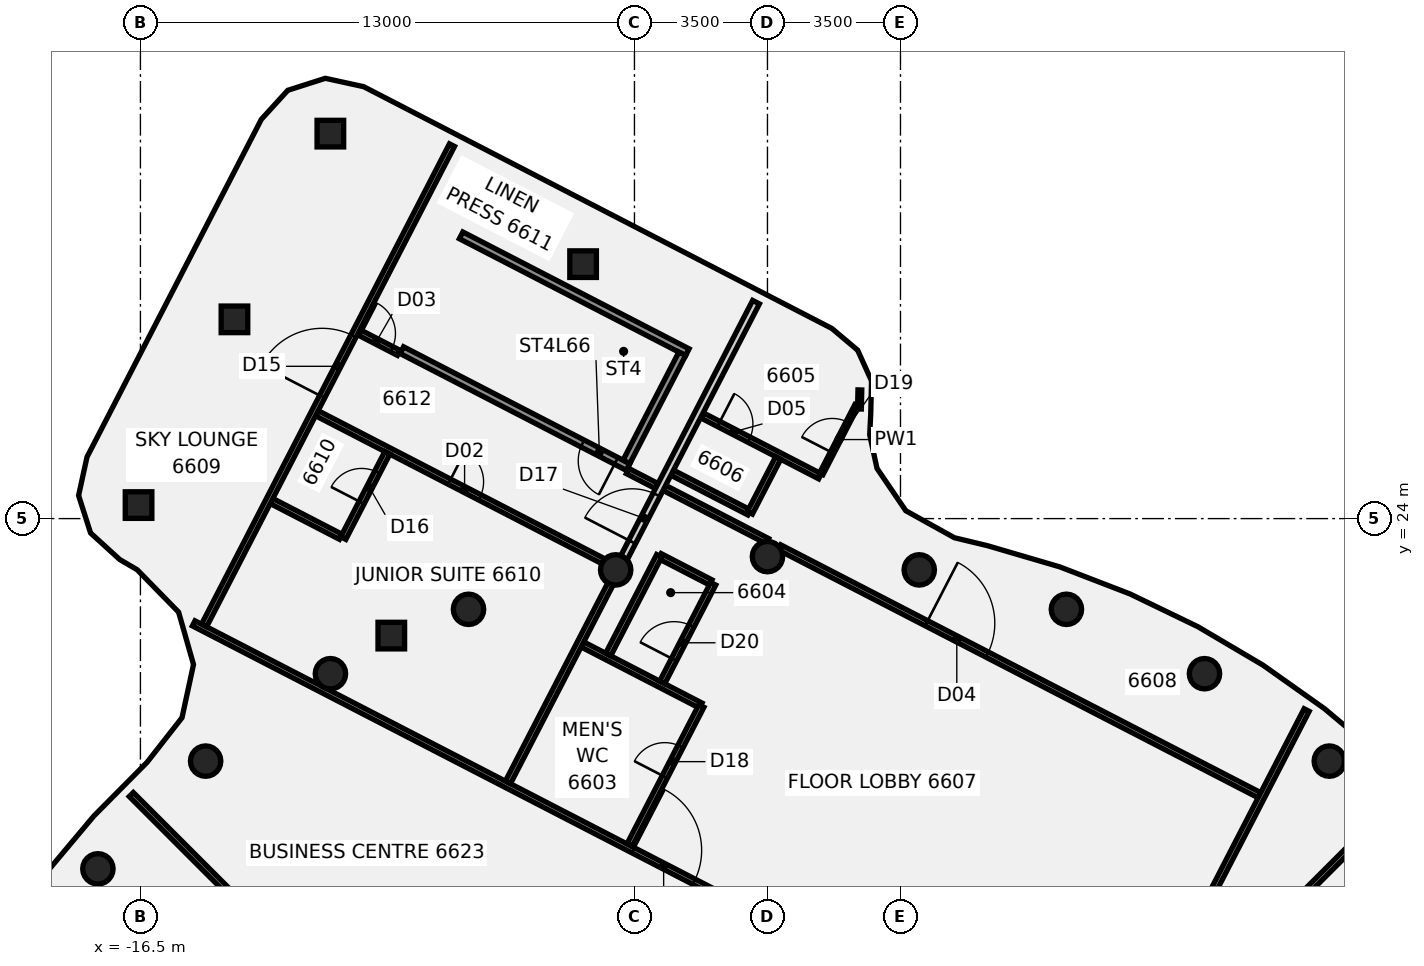
"""IFC4 building model, lengths in metres.
Left out: names, types, materials, properties, quantities, classifications, styles, units other than length and angle.
Written with IfcOpenShell. Run it as: python <this file> out.ifc"""

import sys

from ifc_helpers import new_model, si_unit, direction, frame, frame_2d, origin, origin_2d, place, context, subcontext, project, spatial, polyline, rectangle, circle, outline, extrude, element, fill, save


model = new_model("IFC4")
c1 = context("Model", 3, precision=1e-05, world=origin(), true_north=direction((0.0, 1.0)))
c2 = subcontext(c1, "Body", "Model", "MODEL_VIEW")
j1 = project(units=[si_unit("LENGTHUNIT", "METRE"), si_unit("PLANEANGLEUNIT", "RADIAN")], contexts=[c1])
p1 = place(None, origin())
s1 = spatial("IfcSite", under=j1, at=p1, CompositionType="ELEMENT")
p2 = place(p1, origin())
s2 = spatial("IfcBuilding", under=s1, at=p2, CompositionType="ELEMENT")
p3 = place(p2, frame((0.0, 0.0, 260.4)))
s3 = spatial("IfcBuildingStorey", under=s2, at=p3, CompositionType="ELEMENT", Elevation=260.4)
for number, where, z_axis, x_axis in (
    (1, (14.784, 17.619, -0.14), (0.0, 0.0, 1.0), (1.0, 0.0, 0.0)),
    (2, (11.5, 19.919, -0.14), (0.0, 0.0, 1.0), (1.0, 0.0, 0.0)),
    (3, (7.866, 21.613, -0.14), (0.0, 0.0, 1.0), (1.0, 0.0, 0.0)),
    (4, (3.994, 22.651, -0.14), (0.0, 0.0, 1.0), (1.0, 0.0, 0.0)),
    (5, (0.0, 23.0, -0.14), (0.0, 0.0, 1.0), (1.0, 0.0, 0.0)),
    (6, (-3.994, 22.651, -0.14), (0.0, 0.0, 1.0), (1.0, 0.0, 0.0)),
    (7, (-7.866, 21.613, -0.14), (0.0, 0.0, 1.0), (1.0, 0.0, 0.0)),
    (8, (-11.5, 19.919, -0.14), (0.0, 0.0, 1.0), (1.0, 0.0, 0.0)),
    (9, (-14.784, 17.619, -0.14), (0.0, 0.0, 1.0), (1.0, 0.0, 0.0)),
    (10, (-17.619, 14.784, -0.14), (0.0, 0.0, 1.0), (1.0, 0.0, 0.0)),
):
    element("IfcColumn", number, at=place(p3, frame(where, z_axis=z_axis, x_axis=x_axis)), inside=s3, PredefinedType="COLUMN", context=c2, shape_type="SweptSolid", body=[
        extrude(circle(Radius=0.4, at=origin_2d()), origin(), (0.0, 0.0, 1.0), 3.6),
    ])
for number, where, z_axis, x_axis in (
    (11, (-9.898, 20.921, -0.139), (0.006, -0.05, 0.999), (0.459, 0.887, 0.042)),
    (12, (-4.851, 30.695, -0.139), (-0.044, -0.025, 0.999), (0.888, -0.459, 0.027)),
):
    element("IfcColumn", number, at=place(p3, frame(where, z_axis=z_axis, x_axis=x_axis)), inside=s3, PredefinedType="COLUMN", context=c2, shape_type="SweptSolid", body=[
        extrude(rectangle(XDim=0.7, YDim=0.7, at=origin_2d()), origin(), (0.0, 0.0, 1.0), 3.602),
    ])
p4 = place(p3, frame((-11.502, 34.13, -0.138), z_axis=(0.03313385922, -0.104732687393, 0.993948294211), x_axis=(0.460294571785, 0.884347146574, 0.077839781162)))
e13 = element("IfcColumn", 13, at=p4, inside=s3, PredefinedType="COLUMN", context=c2, shape_type="SweptSolid", body=[
    extrude(rectangle(XDim=0.7, YDim=0.7, at=origin_2d()), origin(), (0.0, 0.0, 1.0), 3.618),
])
p5 = place(p3, frame((-14.026, 29.243, -0.138), z_axis=(0.057759270327, -0.116864910592, 0.991466822119), x_axis=(0.46076619798, 0.884142574373, 0.077371952149)))
e14 = element("IfcColumn", 14, at=p5, inside=s3, PredefinedType="COLUMN", context=c2, shape_type="SweptSolid", body=[
    extrude(rectangle(XDim=0.7, YDim=0.7, at=origin_2d()), origin(), (0.0, 0.0, 1.0), 3.627),
])
p6 = place(p3, frame((-16.549, 24.356, -0.138), z_axis=(0.082069355489, -0.128908611525, 0.988254618388), x_axis=(0.462174840487, 0.883451999176, 0.076856892816)))
e15 = element("IfcColumn", 15, at=p6, inside=s3, PredefinedType="COLUMN", context=c2, shape_type="SweptSolid", body=[
    extrude(rectangle(XDim=0.7, YDim=0.7, at=origin_2d()), origin(), (0.0, 0.0, 1.0), 3.638),
])
p7 = place(p3, frame((-16.74, 16.74, 0.0), z_axis=(0.0, 0.0, 1.0), x_axis=(0.707106781187, -0.707106781187, 0.0)))
e16 = element("IfcWall", 16, at=p7, inside=s3, PredefinedType="PARTITIONING", context=c2, shape_type="SweptSolid", body=[
    extrude(rectangle(XDim=6.691, YDim=0.15, at=frame_2d((3.345, 0.0))), origin(), (0.0, 0.0, 1.0), 2.864),
])
p8 = place(p3, frame((-15.098, 21.244, 0.0), z_axis=(0.0, 0.0, 1.0), x_axis=(0.888519040902, -0.458839747575, 0.0)))
e17 = element("IfcWall", 17, at=p8, inside=s3, PredefinedType="PARTITIONING", context=c2, shape_type="SweptSolid", body=[
    extrude(rectangle(XDim=20.094, YDim=0.15, at=frame_2d((10.047, 0.0))), origin(), (0.0, 0.0, 1.0), 2.864),
])
p9 = place(p8, frame((13.018, 0.0, 0.0)))
e18 = element("IfcOpeningElement", 18, at=p9, cuts=e17, PredefinedType="OPENING", context=c2, shape_type="SweptSolid", body=[
    extrude(rectangle(XDim=1.8, YDim=2.1, at=frame_2d((0.9, 1.05))), frame((0.0, 0.085, 0.0), z_axis=(0.0, -1.0, 0.0), x_axis=(1.0, 0.0, 0.0)), (0.0, 0.0, 1.0), 0.17),
])
p10 = place(p3, frame((-13.05, 24.463, 0.0), z_axis=(0.0, 0.0, 1.0), x_axis=(0.888443709426, -0.458985593653, 0.0)))
e19 = element("IfcWall", 19, at=p10, inside=s3, PredefinedType="PARTITIONING", context=c2, shape_type="SweptSolid", body=[
    extrude(rectangle(XDim=2.051, YDim=0.15, at=frame_2d((1.025, 0.0))), origin(), (0.0, 0.0, 1.0), 2.864),
])
p11 = place(p3, frame((-11.857, 26.773, 0.0), z_axis=(0.0, 0.0, 1.0), x_axis=(0.888435104215, -0.459002250102, 0.0)))
e20 = element("IfcWall", 20, at=p11, inside=s3, PredefinedType="PARTITIONING", context=c2, shape_type="SweptSolid", body=[
    extrude(rectangle(XDim=8.479, YDim=0.15, at=frame_2d((4.24, 0.0))), origin(), (0.0, 0.0, 1.0), 2.864),
])
p12 = place(p11, frame((3.926, 0.0, 0.0)))
e21 = element("IfcOpeningElement", 21, at=p12, cuts=e20, PredefinedType="OPENING", context=c2, shape_type="SweptSolid", body=[
    extrude(rectangle(XDim=0.9, YDim=2.1, at=frame_2d((0.45, 1.05))), frame((0.0, 0.085, 0.0), z_axis=(0.0, -1.0, 0.0), x_axis=(1.0, 0.0, 0.0)), (0.0, 0.0, 1.0), 0.17),
])
p13 = place(p3, frame((-10.755, 28.905, 0.0), z_axis=(0.0, 0.0, 1.0), x_axis=(0.888579996133, -0.458721691739, 0.0)))
e22 = element("IfcWall", 22, at=p13, inside=s3, PredefinedType="PARTITIONING", context=c2, shape_type="SweptSolid", body=[
    extrude(rectangle(XDim=1.184, YDim=0.15, at=frame_2d((0.592, 0.0))), origin(), (0.0, 0.0, 1.0), 2.864),
])
p14 = place(p13, frame((0.075, 0.0, 0.0)))
e23 = element("IfcOpeningElement", 23, at=p14, cuts=e22, PredefinedType="OPENING", context=c2, shape_type="SweptSolid", body=[
    extrude(rectangle(XDim=0.9, YDim=2.1, at=frame_2d((0.45, 1.05))), frame((0.0, 0.085, 0.0), z_axis=(0.0, -1.0, 0.0), x_axis=(1.0, 0.0, 0.0)), (0.0, 0.0, 1.0), 0.17),
])
p15 = place(p3, frame((-3.679, 25.25, 0.0), z_axis=(0.0, 0.0, 1.0), x_axis=(0.888616923334, -0.458650153782, 0.0)))
e24 = element("IfcWall", 24, at=p15, inside=s3, PredefinedType="PARTITIONING", context=c2, shape_type="SweptSolid", body=[
    extrude(rectangle(XDim=0.86, YDim=0.15, at=frame_2d((0.43, 0.0))), origin(), (0.0, 0.0, 1.0), 2.864),
])
p16 = place(p3, frame((-4.869, 20.689, 0.0), z_axis=(0.0, 0.0, 1.0), x_axis=(0.888427327324, -0.459017302575, 0.0)))
e25 = element("IfcWall", 25, at=p16, inside=s3, PredefinedType="PARTITIONING", context=c2, shape_type="SweptSolid", body=[
    extrude(rectangle(XDim=3.505, YDim=0.15, at=frame_2d((1.752, 0.0))), origin(), (0.0, 0.0, 1.0), 2.864),
])
p17 = place(p3, frame((-2.831, 23.012, 0.0), z_axis=(0.0, 0.0, 1.0), x_axis=(0.888612127858, -0.458659444713, 0.0)))
e26 = element("IfcWall", 26, at=p17, inside=s3, PredefinedType="PARTITIONING", context=c2, shape_type="SweptSolid", body=[
    extrude(rectangle(XDim=1.505, YDim=0.15, at=frame_2d((0.753, 0.0))), origin(), (0.0, 0.0, 1.0), 2.864),
])
p18 = place(p3, frame((-2.71, 24.806, 0.0), z_axis=(0.0, 0.0, 1.0), x_axis=(0.888497288197, -0.458881868094, 0.0)))
e27 = element("IfcWall", 27, at=p18, inside=s3, PredefinedType="PARTITIONING", context=c2, shape_type="SweptSolid", body=[
    extrude(rectangle(XDim=3.045, YDim=0.15, at=frame_2d((1.522, 0.0))), origin(), (0.0, 0.0, 1.0), 2.864),
])
p19 = place(p3, frame((0.317, 23.243, 0.0), z_axis=(0.0, 0.0, 1.0), x_axis=(0.888531890229, -0.458814864675, 0.0)))
e28 = element("IfcWall", 28, at=p19, inside=s3, PredefinedType="PARTITIONING", context=c2, shape_type="SweptSolid", body=[
    extrude(rectangle(XDim=14.213, YDim=0.15, at=frame_2d((7.106, 0.0))), origin(), (0.0, 0.0, 1.0), 2.864),
])
p20 = place(p19, frame((4.35, 0.0, 0.0)))
e29 = element("IfcOpeningElement", 29, at=p20, cuts=e28, PredefinedType="OPENING", context=c2, shape_type="SweptSolid", body=[
    extrude(rectangle(XDim=1.8, YDim=2.1, at=frame_2d((0.9, 1.05))), frame((0.0, 0.085, 0.0), z_axis=(0.0, -1.0, 0.0), x_axis=(1.0, 0.0, 0.0)), (0.0, 0.0, 1.0), 0.17),
])
p21 = place(p3, frame((-2.503, 25.206, 0.0), z_axis=(0.0, 0.0, 1.0), x_axis=(0.888511975047, -0.458853429974, 0.0)))
e30 = element("IfcWall", 30, at=p21, inside=s3, PredefinedType="PARTITIONING", context=c2, shape_type="SweptSolid", body=[
    extrude(rectangle(XDim=2.275, YDim=0.15, at=frame_2d((1.137, 0.0))), origin(), (0.0, 0.0, 1.0), 2.864),
])
p22 = place(p3, frame((-1.723, 26.717, 0.0), z_axis=(0.0, 0.0, 1.0), x_axis=(0.888352291306, -0.459162505581, 0.0)))
e31 = element("IfcWall", 31, at=p22, inside=s3, PredefinedType="PARTITIONING", context=c2, shape_type="SweptSolid", body=[
    extrude(rectangle(XDim=3.494, YDim=0.15, at=frame_2d((1.747, 0.0))), origin(), (0.0, 0.0, 1.0), 2.864),
])
p23 = place(p22, frame((0.495, 0.0, 0.0)))
e32 = element("IfcOpeningElement", 32, at=p23, cuts=e31, PredefinedType="OPENING", context=c2, shape_type="SweptSolid", body=[
    extrude(rectangle(XDim=0.9, YDim=2.1, at=frame_2d((0.45, 1.05))), frame((0.0, 0.085, 0.0), z_axis=(0.0, -1.0, 0.0), x_axis=(1.0, 0.0, 0.0)), (0.0, 0.0, 1.0), 0.17),
])
p24 = place(p3, frame((12.01, 12.01, 0.0), z_axis=(0.0, 0.0, 1.0), x_axis=(0.707106781187, 0.707106781187, 0.0)))
e33 = element("IfcWall", 33, at=p24, inside=s3, PredefinedType="PARTITIONING", context=c2, shape_type="SweptSolid", body=[
    extrude(rectangle(XDim=6.691, YDim=0.15, at=frame_2d((3.345, 0.0))), origin(), (0.0, 0.0, 1.0), 2.864),
])
p25 = place(p3, frame((-14.823, 21.191, 0.0), z_axis=(0.0, 0.0, 1.0), x_axis=(0.458646418676, 0.888618851159, 0.0)))
e34 = element("IfcWall", 34, at=p25, inside=s3, PredefinedType="PARTITIONING", context=c2, shape_type="SweptSolid", body=[
    extrude(rectangle(XDim=14.219, YDim=0.15, at=frame_2d((7.109, 0.0))), origin(), (0.0, 0.0, 1.0), 2.864),
])
p26 = place(p25, frame((6.77, 0.0, 0.0)))
e35 = element("IfcOpeningElement", 35, at=p26, cuts=e34, PredefinedType="OPENING", context=c2, shape_type="SweptSolid", body=[
    extrude(rectangle(XDim=1.8, YDim=2.1, at=frame_2d((0.9, 1.05))), frame((0.0, 0.085, 0.0), z_axis=(0.0, -1.0, 0.0), x_axis=(1.0, 0.0, 0.0)), (0.0, 0.0, 1.0), 0.17),
])
p27 = place(p3, frame((-11.162, 23.487, 0.0), z_axis=(0.0, 0.0, 1.0), x_axis=(0.458894122505, 0.88849095906, 0.0)))
e36 = element("IfcWall", 36, at=p27, inside=s3, PredefinedType="PARTITIONING", context=c2, shape_type="SweptSolid", body=[
    extrude(rectangle(XDim=2.525, YDim=0.15, at=frame_2d((1.262, 0.0))), origin(), (0.0, 0.0, 1.0), 2.864),
])
p28 = place(p27, frame((1.05, 0.0, 0.0)))
e37 = element("IfcOpeningElement", 37, at=p28, cuts=e36, PredefinedType="OPENING", context=c2, shape_type="SweptSolid", body=[
    extrude(rectangle(XDim=0.9, YDim=2.1, at=frame_2d((0.45, 1.05))), frame((0.0, 0.085, 0.0), z_axis=(0.0, -1.0, 0.0), x_axis=(1.0, 0.0, 0.0)), (0.0, 0.0, 1.0), 0.17),
])
p29 = place(p3, frame((-6.827, 17.062, 0.0), z_axis=(0.0, 0.0, 1.0), x_axis=(0.459003045801, 0.888434693123, 0.0)))
e38 = element("IfcWall", 38, at=p29, inside=s3, PredefinedType="PARTITIONING", context=c2, shape_type="SweptSolid", body=[
    extrude(rectangle(XDim=6.043, YDim=0.15, at=frame_2d((3.022, 0.0))), origin(), (0.0, 0.0, 1.0), 2.864),
])
p30 = place(p3, frame((-3.847, 22.831, 0.0), z_axis=(0.0, 0.0, 1.0), x_axis=(0.458980973869, 0.888446096072, 0.0)))
e39 = element("IfcWall", 39, at=p30, inside=s3, PredefinedType="PARTITIONING", context=c2, shape_type="SweptSolid", body=[
    extrude(rectangle(XDim=7.726, YDim=0.2, at=frame_2d((3.863, 0.0))), origin(), (0.0, 0.0, 1.0), 2.864),
])
p31 = place(p30, frame((0.623, 0.0, 0.0)))
e40 = element("IfcOpeningElement", 40, at=p31, cuts=e39, PredefinedType="OPENING", context=c2, shape_type="SweptSolid", body=[
    extrude(rectangle(XDim=1.4, YDim=2.1, at=frame_2d((0.7, 1.05))), frame((0.0, 0.11, 0.0), z_axis=(0.0, -1.0, 0.0), x_axis=(1.0, 0.0, 0.0)), (0.0, 0.0, 1.0), 0.22),
])
p32 = place(p3, frame((-4.191, 20.423, 0.0), z_axis=(0.0, 0.0, 1.0), x_axis=(0.458764133675, 0.888558084569, 0.0)))
e41 = element("IfcWall", 41, at=p32, inside=s3, PredefinedType="PARTITIONING", context=c2, shape_type="SweptSolid", body=[
    extrude(rectangle(XDim=2.924, YDim=0.15, at=frame_2d((1.462, 0.0))), origin(), (0.0, 0.0, 1.0), 2.864),
])
p33 = place(p3, frame((-3.628, 15.41, 0.0), z_axis=(0.0, 0.0, 1.0), x_axis=(0.458813471037, 0.888532609866, 0.0)))
e42 = element("IfcWall", 42, at=p33, inside=s3, PredefinedType="PARTITIONING", context=c2, shape_type="SweptSolid", body=[
    extrude(rectangle(XDim=4.12, YDim=0.15, at=frame_2d((2.06, 0.0))), origin(), (0.0, 0.0, 1.0), 2.864),
])
p34 = place(p33, frame((2.02, 0.0, 0.0)))
e43 = element("IfcOpeningElement", 43, at=p34, cuts=e42, PredefinedType="OPENING", context=c2, shape_type="SweptSolid", body=[
    extrude(rectangle(XDim=0.9, YDim=2.1, at=frame_2d((0.45, 1.05))), frame((0.0, 0.085, 0.0), z_axis=(0.0, -1.0, 0.0), x_axis=(1.0, 0.0, 0.0)), (0.0, 0.0, 1.0), 0.17),
])
p35 = place(p3, frame((1.416, 25.18, 0.0), z_axis=(0.0, 0.0, 1.0), x_axis=(0.458747305615, 0.888566772725, 0.0)))
e44 = element("IfcWall", 44, at=p35, inside=s3, PredefinedType="PARTITIONING", context=c2, shape_type="SweptSolid", body=[
    extrude(rectangle(XDim=2.026, YDim=0.1, at=frame_2d((1.013, 0.0))), origin(), (0.0, 0.0, 1.0), 2.864),
])
p36 = place(p35, frame((0.625, 0.0, 0.0)))
e45 = element("IfcOpeningElement", 45, at=p36, cuts=e44, PredefinedType="OPENING", context=c2, shape_type="SweptSolid", body=[
    extrude(rectangle(XDim=0.9, YDim=2.1, at=frame_2d((0.45, 1.05))), frame((0.0, 0.06, 0.0), z_axis=(0.0, -1.0, 0.0), x_axis=(1.0, 0.0, 0.0)), (0.0, 0.0, 1.0), 0.12),
])
p37 = place(p3, frame((-2.77, 19.689, 0.0), z_axis=(0.0, 0.0, 1.0), x_axis=(0.459027738639, 0.888421935321, 0.0)))
e46 = element("IfcWall", 46, at=p37, inside=s3, PredefinedType="PARTITIONING", context=c2, shape_type="SweptSolid", body=[
    extrude(rectangle(XDim=2.925, YDim=0.15, at=frame_2d((1.462, 0.0))), origin(), (0.0, 0.0, 1.0), 2.864),
])
p38 = place(p37, frame((0.675, 0.0, 0.0)))
e47 = element("IfcOpeningElement", 47, at=p38, cuts=e46, PredefinedType="OPENING", context=c2, shape_type="SweptSolid", body=[
    extrude(rectangle(XDim=1.0, YDim=2.1, at=frame_2d((0.5, 1.05))), frame((0.0, 0.085, 0.0), z_axis=(0.0, -1.0, 0.0), x_axis=(1.0, 0.0, 0.0)), (0.0, 0.0, 1.0), 0.17),
])
p39 = place(p3, frame((-0.463, 24.153, 0.0), z_axis=(0.0, 0.0, 1.0), x_axis=(0.459136695029, 0.888365631527, 0.0)))
e48 = element("IfcWall", 48, at=p39, inside=s3, PredefinedType="PARTITIONING", context=c2, shape_type="SweptSolid", body=[
    extrude(rectangle(XDim=1.625, YDim=0.15, at=frame_2d((0.812, 0.0))), origin(), (0.0, 0.0, 1.0), 2.864),
])
p40 = place(p3, frame((10.589, 11.993, 0.0), z_axis=(0.0, 0.0, 1.0), x_axis=(0.458841921055, 0.888517918493, 0.0)))
e49 = element("IfcWall", 49, at=p40, inside=s3, PredefinedType="PARTITIONING", context=c2, shape_type="SweptSolid", body=[
    extrude(rectangle(XDim=7.844, YDim=0.15, at=frame_2d((3.922, 0.0))), origin(), (0.0, 0.0, 1.0), 2.864),
])
p41 = place(p3, frame((2.42, 26.885, 0.0), z_axis=(0.0, 0.0, 1.0), x_axis=(0.022943177842, 0.99973677065, 0.0)))
e50 = element("IfcWall", 50, at=p41, inside=s3, PredefinedType="PARTITIONING", context=c2, shape_type="SweptSolid", body=[
    extrude(rectangle(XDim=0.5, YDim=0.1, at=frame_2d((0.25, 0.0))), origin(), (0.0, 0.0, 1.0), 2.864),
])
p42 = place(p3, frame((-3.668, 25.357, -0.14), z_axis=(0.0, 0.0, 1.0), x_axis=(-0.888520991089, 0.45883597112, 0.0)))
e51 = element("IfcWall", 51, at=p42, inside=s3, PredefinedType="SHEAR", context=c2, shape_type="SweptSolid", body=[
    extrude(rectangle(XDim=6.7, YDim=0.2, at=frame_2d((3.35, 0.0))), origin(), (0.0, 0.0, 1.0), 3.154),
])
p43 = place(p42, frame((0.35, 0.0, 0.0)))
e52 = element("IfcOpeningElement", 52, at=p43, cuts=e51, PredefinedType="OPENING", context=c2, shape_type="SweptSolid", body=[
    extrude(rectangle(XDim=1.0, YDim=2.1, at=frame_2d((0.5, 1.05))), frame((0.0, 0.11, 0.0), z_axis=(0.0, -1.0, 0.0), x_axis=(1.0, 0.0, 0.0)), (0.0, 0.0, 1.0), 0.22),
])
p44 = place(p3, frame((-2.108, 28.378, -0.14), z_axis=(0.0, 0.0, 1.0), x_axis=(-0.888520991089, 0.45883597112, 0.0)))
e53 = element("IfcWall", 53, at=p44, inside=s3, PredefinedType="SHEAR", context=c2, shape_type="SweptSolid", body=[
    extrude(rectangle(XDim=6.7, YDim=0.2, at=frame_2d((3.35, 0.0))), origin(), (0.0, 0.0, 1.0), 3.154),
])
p45 = place(p3, frame((-2.243, 28.335, -0.14), z_axis=(0.0, 0.0, 1.0), x_axis=(-0.458833362648, -0.88852233811, 0.0)))
e54 = element("IfcWall", 54, at=p45, inside=s3, PredefinedType="SHEAR", context=c2, shape_type="SweptSolid", body=[
    extrude(rectangle(XDim=3.2, YDim=0.2, at=frame_2d((1.6, 0.0))), origin(), (0.0, 0.0, 1.0), 3.6),
])
p46 = place(p3, frame((0.0, 0.0, -0.14)))
e55 = element("IfcWall", 55, at=p46, inside=s3, PredefinedType="SHEAR", context=c2, shape_type="SweptSolid", body=[
    extrude(outline(polyline([(-7.93, 31.272), (-8.107, 31.364), (-9.576, 28.521), (-9.398, 28.429), (-7.93, 31.272)])), origin(), (0.0, 0.0, 1.0), 3.6),
])
p47 = place(p9, origin())
e56 = element("IfcDoor", 56, at=p47, inside=s3, OperationType="DOUBLE_DOOR_SINGLE_SWING", PredefinedType="DOOR", context=c2, shape_type="SweptSolid", body=[
    extrude(rectangle(XDim=1.8, YDim=2.1, at=frame_2d((0.9, 1.05))), frame((0.0, 0.025, 0.0), z_axis=(0.0, -1.0, 0.0), x_axis=(1.0, 0.0, 0.0)), (0.0, 0.0, 1.0), 0.05),
])
fill(e18, e56)
p48 = place(p12, frame((0.9, 0.0, 0.0), z_axis=(0.0, 0.0, 1.0), x_axis=(-1.0, 0.0, 0.0)))
e57 = element("IfcDoor", 57, at=p48, inside=s3, OperationType="SINGLE_SWING_RIGHT", PredefinedType="DOOR", context=c2, shape_type="SweptSolid", body=[
    extrude(rectangle(XDim=0.9, YDim=2.1, at=frame_2d((0.45, 1.05))), frame((0.0, 0.025, 0.0), z_axis=(0.0, -1.0, 0.0), x_axis=(1.0, 0.0, 0.0)), (0.0, 0.0, 1.0), 0.05),
])
fill(e21, e57)
p49 = place(p14, origin())
e58 = element("IfcDoor", 58, at=p49, inside=s3, OperationType="SINGLE_SWING_RIGHT", PredefinedType="DOOR", context=c2, shape_type="SweptSolid", body=[
    extrude(rectangle(XDim=0.9, YDim=2.1, at=frame_2d((0.45, 1.05))), frame((0.0, 0.025, 0.0), z_axis=(0.0, -1.0, 0.0), x_axis=(1.0, 0.0, 0.0)), (0.0, 0.0, 1.0), 0.05),
])
fill(e23, e58)
p50 = place(p20, origin())
e59 = element("IfcDoor", 59, at=p50, inside=s3, OperationType="DOUBLE_DOOR_SINGLE_SWING", PredefinedType="DOOR", context=c2, shape_type="SweptSolid", body=[
    extrude(rectangle(XDim=1.8, YDim=2.1, at=frame_2d((0.9, 1.05))), frame((0.0, 0.025, 0.0), z_axis=(0.0, -1.0, 0.0), x_axis=(1.0, 0.0, 0.0)), (0.0, 0.0, 1.0), 0.05),
])
fill(e29, e59)
p51 = place(p23, frame((0.9, 0.0, 0.0), z_axis=(0.0, 0.0, 1.0), x_axis=(-1.0, 0.0, 0.0)))
e60 = element("IfcDoor", 60, at=p51, inside=s3, OperationType="SINGLE_SWING_LEFT", PredefinedType="DOOR", context=c2, shape_type="SweptSolid", body=[
    extrude(rectangle(XDim=0.9, YDim=2.1, at=frame_2d((0.45, 1.05))), frame((0.0, 0.025, 0.0), z_axis=(0.0, -1.0, 0.0), x_axis=(1.0, 0.0, 0.0)), (0.0, 0.0, 1.0), 0.05),
])
fill(e32, e60)
p52 = place(p26, origin())
e61 = element("IfcDoor", 61, at=p52, inside=s3, OperationType="DOUBLE_DOOR_SINGLE_SWING", PredefinedType="DOOR", context=c2, shape_type="SweptSolid", body=[
    extrude(rectangle(XDim=1.8, YDim=2.1, at=frame_2d((0.9, 1.05))), frame((0.0, 0.025, 0.0), z_axis=(0.0, -1.0, 0.0), x_axis=(1.0, 0.0, 0.0)), (0.0, 0.0, 1.0), 0.05),
])
fill(e35, e61)
p53 = place(p28, origin())
e62 = element("IfcDoor", 62, at=p53, inside=s3, OperationType="SINGLE_SWING_LEFT", PredefinedType="DOOR", context=c2, shape_type="SweptSolid", body=[
    extrude(rectangle(XDim=0.9, YDim=2.1, at=frame_2d((0.45, 1.05))), frame((0.0, 0.025, 0.0), z_axis=(0.0, -1.0, 0.0), x_axis=(1.0, 0.0, 0.0)), (0.0, 0.0, 1.0), 0.05),
])
fill(e37, e62)
p54 = place(p31, frame((1.4, 0.0, 0.0), z_axis=(0.0, 0.0, 1.0), x_axis=(-1.0, 0.0, 0.0)))
e63 = element("IfcDoor", 63, at=p54, inside=s3, OperationType="DOUBLE_DOOR_SINGLE_SWING", PredefinedType="DOOR", context=c2, shape_type="SweptSolid", body=[
    extrude(rectangle(XDim=1.4, YDim=2.1, at=frame_2d((0.7, 1.05))), frame((0.0, 0.025, 0.0), z_axis=(0.0, -1.0, 0.0), x_axis=(1.0, 0.0, 0.0)), (0.0, 0.0, 1.0), 0.05),
])
fill(e40, e63)
p55 = place(p34, origin())
e64 = element("IfcDoor", 64, at=p55, inside=s3, OperationType="SINGLE_SWING_LEFT", PredefinedType="DOOR", context=c2, shape_type="SweptSolid", body=[
    extrude(rectangle(XDim=0.9, YDim=2.1, at=frame_2d((0.45, 1.05))), frame((0.0, 0.025, 0.0), z_axis=(0.0, -1.0, 0.0), x_axis=(1.0, 0.0, 0.0)), (0.0, 0.0, 1.0), 0.05),
])
fill(e43, e64)
p56 = place(p36, origin())
e65 = element("IfcDoor", 65, at=p56, inside=s3, OperationType="SINGLE_SWING_LEFT", PredefinedType="DOOR", context=c2, shape_type="SweptSolid", body=[
    extrude(rectangle(XDim=0.9, YDim=2.1, at=frame_2d((0.45, 1.05))), frame((0.0, 0.025, 0.0), z_axis=(0.0, -1.0, 0.0), x_axis=(1.0, 0.0, 0.0)), (0.0, 0.0, 1.0), 0.05),
])
fill(e45, e65)
p57 = place(p38, origin())
e66 = element("IfcDoor", 66, at=p57, inside=s3, OperationType="SINGLE_SWING_RIGHT", PredefinedType="DOOR", context=c2, shape_type="SweptSolid", body=[
    extrude(rectangle(XDim=1.0, YDim=2.1, at=frame_2d((0.5, 1.05))), frame((0.0, 0.025, 0.0), z_axis=(0.0, -1.0, 0.0), x_axis=(1.0, 0.0, 0.0)), (0.0, 0.0, 1.0), 0.05),
])
fill(e47, e66)
p58 = place(p43, origin())
e67 = element("IfcDoor", 67, at=p58, inside=s3, OperationType="SINGLE_SWING_LEFT", PredefinedType="DOOR", context=c2, shape_type="SweptSolid", body=[
    extrude(rectangle(XDim=1.0, YDim=2.1, at=frame_2d((0.5, 1.05))), frame((0.0, 0.025, 0.0), z_axis=(0.0, -1.0, 0.0), x_axis=(1.0, 0.0, 0.0)), (0.0, 0.0, 1.0), 0.05),
])
fill(e52, e67)
save(model, sys.argv[1])
